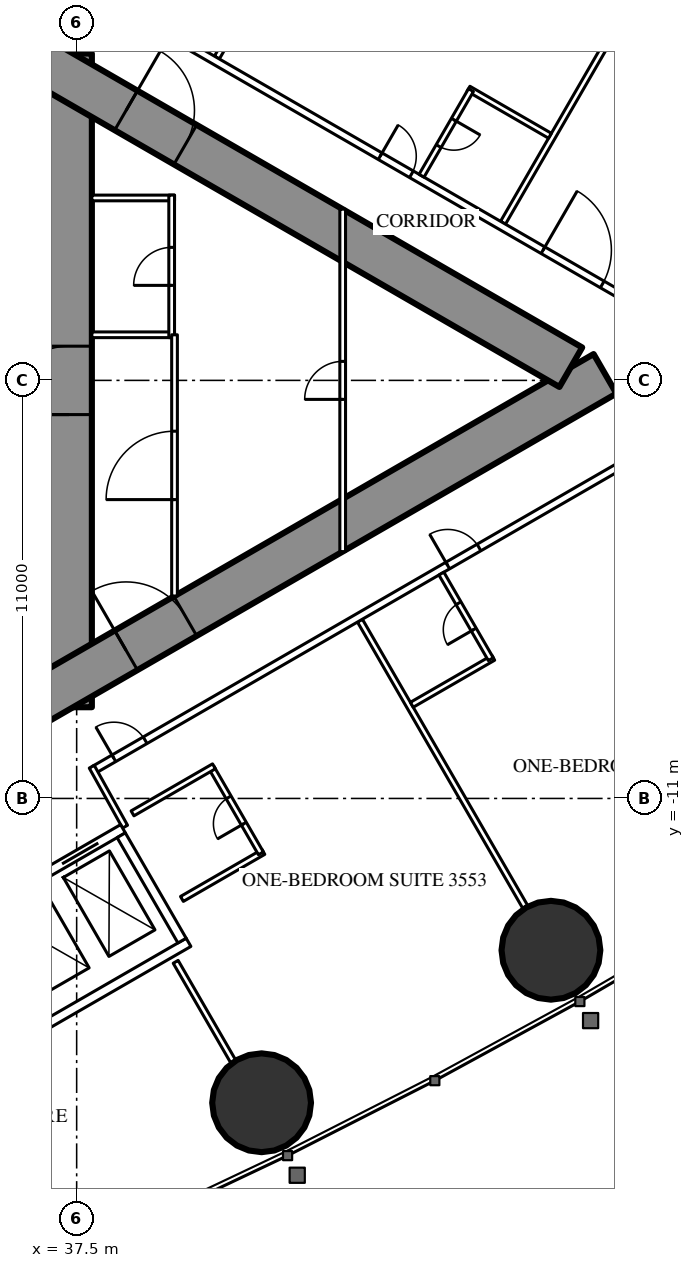
"""IFC4 building model, lengths in metres.
Left out: names, types, materials, properties, quantities, classifications, styles, units other than length and angle.
Written with IfcOpenShell. Run it as: python <this file> out.ifc"""

import sys

from ifc_helpers import new_model, si_unit, direction, frame, frame_2d, origin, origin_2d, place, context, subcontext, project, spatial, rectangle, hollow_circle, extrude, element, fill, save


model = new_model("IFC4")
c1 = context("Model", 3, precision=1e-05, world=origin(), true_north=direction((0.0, 1.0)))
c2 = subcontext(c1, "Body", "Model", "MODEL_VIEW")
j1 = project(units=[si_unit("LENGTHUNIT", "METRE"), si_unit("PLANEANGLEUNIT", "RADIAN")], contexts=[c1])
p1 = place(None, origin())
s1 = spatial("IfcSite", under=j1, at=p1, CompositionType="ELEMENT")
p2 = place(p1, origin())
s2 = spatial("IfcBuilding", under=s1, at=p2, CompositionType="ELEMENT")
p3 = place(p2, frame((0.0, 0.0, 132.6)))
s3 = spatial("IfcBuildingStorey", under=s2, at=p3, CompositionType="ELEMENT", Elevation=132.6)
for number, where, z_axis, x_axis in (
    (1, (42.366, -19.007, 0.0), (0.0, 0.0, 1.0), (1.0, 0.0, 0.0)),
    (2, (49.979, -14.994, 0.0), (0.0, 0.0, 1.0), (1.0, 0.0, 0.0)),
):
    element("IfcColumn", number, at=place(p3, frame(where, z_axis=z_axis, x_axis=x_axis)), inside=s3, PredefinedType="COLUMN", context=c2, shape_type="SweptSolid", body=[
        extrude(hollow_circle(Radius=1.3, WallThickness=0.1, at=origin_2d()), origin(), (0.0, 0.0, 1.0), 3.5),
    ])
p4 = place(p3, frame((37.3, -8.6, 0.0), z_axis=(0.0, 0.0, 1.0), x_axis=(0.0, 1.0, 0.0)))
e3 = element("IfcWall", 3, at=p4, inside=s3, PredefinedType="SHEAR", context=c2, shape_type="SweptSolid", body=[
    extrude(rectangle(XDim=17.2, YDim=1.2, at=frame_2d((8.6, 0.0))), origin(), (0.0, 0.0, 1.0), 3.5),
])
p5 = place(p4, frame((7.7, 0.0, 0.0)))
e4 = element("IfcOpeningElement", 4, at=p5, cuts=e3, PredefinedType="OPENING", context=c2, shape_type="SweptSolid", body=[
    extrude(rectangle(XDim=1.8, YDim=2.2, at=frame_2d((0.9, 1.1))), frame((0.0, 0.61, 0.0), z_axis=(0.0, -1.0, 0.0), x_axis=(1.0, 0.0, 0.0)), (0.0, 0.0, 1.0), 1.22),
])
p6 = place(p3, frame((27.2, -13.8, 0.0), z_axis=(0.0, 0.0, 1.0), x_axis=(0.866027159892, 0.499996958321, 0.0)))
e5 = element("IfcWall", 5, at=p6, inside=s3, PredefinedType="SHEAR", context=c2, shape_type="SweptSolid", body=[
    extrude(rectangle(XDim=27.947, YDim=1.2, at=frame_2d((13.973, 0.0))), origin(), (0.0, 0.0, 1.0), 3.5),
])
p7 = place(p6, frame((4.6, 0.0, 0.0)))
e6 = element("IfcOpeningElement", 6, at=p7, cuts=e5, PredefinedType="OPENING", context=c2, shape_type="SweptSolid", body=[
    extrude(rectangle(XDim=1.0, YDim=2.2, at=frame_2d((0.5, 1.1))), frame((0.0, 0.61, 0.0), z_axis=(0.0, -1.0, 0.0), x_axis=(1.0, 0.0, 0.0)), (0.0, 0.0, 1.0), 1.22),
])
p8 = place(p6, frame((13.395, 0.0, 0.0)))
e7 = element("IfcOpeningElement", 7, at=p8, cuts=e5, PredefinedType="OPENING", context=c2, shape_type="SweptSolid", body=[
    extrude(rectangle(XDim=1.8, YDim=2.2, at=frame_2d((0.9, 1.1))), frame((0.0, 0.61, 0.0), z_axis=(0.0, -1.0, 0.0), x_axis=(1.0, 0.0, 0.0)), (0.0, 0.0, 1.0), 1.22),
])
p9 = place(p3, frame((27.2, 13.8, 0.0), z_axis=(0.0, 0.0, 1.0), x_axis=(0.866024515034, -0.500001539357, 0.0)))
e8 = element("IfcWall", 8, at=p9, inside=s3, PredefinedType="SHEAR", context=c2, shape_type="SweptSolid", body=[
    extrude(rectangle(XDim=26.907, YDim=1.2, at=frame_2d((13.454, 0.0))), origin(), (0.0, 0.0, 1.0), 3.5),
])
p10 = place(p9, frame((4.6, 0.0, 0.0)))
e9 = element("IfcOpeningElement", 9, at=p10, cuts=e8, PredefinedType="OPENING", context=c2, shape_type="SweptSolid", body=[
    extrude(rectangle(XDim=1.0, YDim=2.2, at=frame_2d((0.5, 1.1))), frame((0.0, 0.61, 0.0), z_axis=(0.0, -1.0, 0.0), x_axis=(1.0, 0.0, 0.0)), (0.0, 0.0, 1.0), 1.22),
])
p11 = place(p9, frame((13.395, 0.0, 0.0)))
e10 = element("IfcOpeningElement", 10, at=p11, cuts=e8, PredefinedType="OPENING", context=c2, shape_type="SweptSolid", body=[
    extrude(rectangle(XDim=1.8, YDim=2.2, at=frame_2d((0.9, 1.1))), frame((0.0, 0.61, 0.0), z_axis=(0.0, -1.0, 0.0), x_axis=(1.0, 0.0, 0.0)), (0.0, 0.0, 1.0), 1.22),
])
p12 = place(p3, frame((44.954, -6.321, 0.0), z_axis=(0.0, 0.0, 1.0), x_axis=(0.500018676722, -0.866014620505, 0.0)))
e11 = element("IfcWall", 11, at=p12, inside=s3, PredefinedType="PARTITIONING", context=c2, shape_type="SweptSolid", body=[
    extrude(rectangle(XDim=8.704, YDim=0.15, at=frame_2d((4.352, 0.0))), origin(), (0.0, 0.0, 1.0), 2.2),
])
p13 = place(p3, frame((41.19, 8.494, 0.0), z_axis=(0.0, 0.0, 1.0), x_axis=(0.49999258054, 0.866029687369, 0.0)))
e12 = element("IfcWall", 12, at=p13, inside=s3, PredefinedType="PARTITIONING", context=c2, shape_type="SweptSolid", body=[
    extrude(rectangle(XDim=11.318, YDim=0.15, at=frame_2d((5.659, 0.0))), origin(), (0.0, 0.0, 1.0), 3.25),
])
p14 = place(p3, frame((48.719, 4.147, 0.0), z_axis=(0.0, 0.0, 1.0), x_axis=(0.499993328235, 0.866029255696, 0.0)))
e13 = element("IfcWall", 13, at=p14, inside=s3, PredefinedType="PARTITIONING", context=c2, shape_type="SweptSolid", body=[
    extrude(rectangle(XDim=8.686, YDim=0.15, at=frame_2d((4.343, 0.0))), origin(), (0.0, 0.0, 1.0), 2.2),
])
p15 = place(p3, frame((40.105, -15.299, 0.0), z_axis=(0.0, 0.0, 1.0), x_axis=(0.499978822259, -0.866037630414, 0.0)))
e14 = element("IfcWall", 14, at=p15, inside=s3, PredefinedType="PARTITIONING", context=c2, shape_type="SweptSolid", body=[
    extrude(rectangle(XDim=3.023, YDim=0.15, at=frame_2d((1.511, 0.0))), origin(), (0.0, 0.0, 1.0), 3.25),
])
p16 = place(p3, frame((37.96, -10.243, 0.0), z_axis=(0.0, 0.0, 1.0), x_axis=(0.866026429433, 0.499998223521, 0.0)))
e15 = element("IfcWall", 15, at=p16, inside=s3, PredefinedType="PARTITIONING", context=c2, shape_type="SweptSolid", body=[
    extrude(rectangle(XDim=20.487, YDim=0.2, at=frame_2d((10.243, 0.0))), origin(), (0.0, 0.0, 1.0), 3.25),
])
p17 = place(p16, frame((10.743, 0.0, 0.0)))
e16 = element("IfcOpeningElement", 16, at=p17, cuts=e15, PredefinedType="OPENING", context=c2, shape_type="SweptSolid", body=[
    extrude(rectangle(XDim=0.95, YDim=2.2, at=frame_2d((0.475, 1.1))), frame((0.0, 0.11, 0.0), z_axis=(0.0, -1.0, 0.0), x_axis=(1.0, 0.0, 0.0)), (0.0, 0.0, 1.0), 0.22),
])
p18 = place(p16, frame((17.586, 0.0, 0.0)))
e17 = element("IfcOpeningElement", 17, at=p18, cuts=e15, PredefinedType="OPENING", context=c2, shape_type="SweptSolid", body=[
    extrude(rectangle(XDim=1.8, YDim=2.2, at=frame_2d((0.9, 1.1))), frame((0.0, 0.11, 0.0), z_axis=(0.0, -1.0, 0.0), x_axis=(1.0, 0.0, 0.0)), (0.0, 0.0, 1.0), 0.22),
])
p19 = place(p16, frame((0.6, 0.0, 0.0)))
e18 = element("IfcOpeningElement", 18, at=p19, cuts=e15, PredefinedType="OPENING", context=c2, shape_type="SweptSolid", body=[
    extrude(rectangle(XDim=0.95, YDim=2.2, at=frame_2d((0.475, 1.1))), frame((0.0, 0.11, 0.0), z_axis=(0.0, -1.0, 0.0), x_axis=(1.0, 0.0, 0.0)), (0.0, 0.0, 1.0), 0.22),
])
p20 = place(p3, frame((36.834, 10.894, 0.0), z_axis=(0.0, 0.0, 1.0), x_axis=(0.866028157229, -0.499995230863, 0.0)))
e19 = element("IfcWall", 19, at=p20, inside=s3, PredefinedType="PARTITIONING", context=c2, shape_type="SweptSolid", body=[
    extrude(rectangle(XDim=21.667, YDim=0.2, at=frame_2d((10.833, 0.0))), origin(), (0.0, 0.0, 1.0), 3.25),
])
p21 = place(p20, frame((20.117, 0.0, 0.0)))
e20 = element("IfcOpeningElement", 20, at=p21, cuts=e19, PredefinedType="OPENING", context=c2, shape_type="SweptSolid", body=[
    extrude(rectangle(XDim=0.95, YDim=2.2, at=frame_2d((0.475, 1.1))), frame((0.0, 0.11, 0.0), z_axis=(0.0, -1.0, 0.0), x_axis=(1.0, 0.0, 0.0)), (0.0, 0.0, 1.0), 0.22),
])
p22 = place(p20, frame((14.938, 0.0, 0.0)))
e21 = element("IfcOpeningElement", 21, at=p22, cuts=e19, PredefinedType="OPENING", context=c2, shape_type="SweptSolid", body=[
    extrude(rectangle(XDim=1.8, YDim=2.2, at=frame_2d((0.9, 1.1))), frame((0.0, 0.11, 0.0), z_axis=(0.0, -1.0, 0.0), x_axis=(1.0, 0.0, 0.0)), (0.0, 0.0, 1.0), 0.22),
])
p23 = place(p20, frame((9.99, 0.0, 0.0)))
e22 = element("IfcOpeningElement", 22, at=p23, cuts=e19, PredefinedType="OPENING", context=c2, shape_type="SweptSolid", body=[
    extrude(rectangle(XDim=0.95, YDim=2.2, at=frame_2d((0.475, 1.1))), frame((0.0, 0.11, 0.0), z_axis=(0.0, -1.0, 0.0), x_axis=(1.0, 0.0, 0.0)), (0.0, 0.0, 1.0), 0.22),
])
p24 = place(p20, frame((3.35, 0.0, 0.0)))
e23 = element("IfcOpeningElement", 23, at=p24, cuts=e19, PredefinedType="OPENING", context=c2, shape_type="SweptSolid", body=[
    extrude(rectangle(XDim=1.0, YDim=2.2, at=frame_2d((0.5, 1.1))), frame((0.0, 0.11, 0.0), z_axis=(0.0, -1.0, 0.0), x_axis=(1.0, 0.0, 0.0)), (0.0, 0.0, 1.0), 0.22),
])
p25 = place(p3, frame((38.773, -11.742, 0.0), z_axis=(0.0, 0.0, 1.0), x_axis=(-0.485528096672, 0.8742210632, 0.0)))
e24 = element("IfcWall", 24, at=p25, inside=s3, PredefinedType="PARTITIONING", context=c2, shape_type="SweptSolid", body=[
    extrude(rectangle(XDim=1.805, YDim=0.15, at=frame_2d((0.903, 0.0))), origin(), (0.0, 0.0, 1.0), 3.25),
])
p26 = place(p3, frame((46.319, -8.535, 0.0), z_axis=(0.0, 0.0, 1.0), x_axis=(0.866006523861, 0.500032699561, 0.0)))
e25 = element("IfcWall", 25, at=p26, inside=s3, PredefinedType="PARTITIONING", context=c2, shape_type="SweptSolid", body=[
    extrude(rectangle(XDim=2.475, YDim=0.15, at=frame_2d((1.237, 0.0))), origin(), (0.0, 0.0, 1.0), 3.25),
])
p27 = place(p3, frame((47.097, -5.084, 0.0), z_axis=(0.0, 0.0, 1.0), x_axis=(0.500006934395, -0.866021400173, 0.0)))
e26 = element("IfcWall", 26, at=p27, inside=s3, PredefinedType="PARTITIONING", context=c2, shape_type="SweptSolid", body=[
    extrude(rectangle(XDim=2.6, YDim=0.15, at=frame_2d((1.3, 0.0))), origin(), (0.0, 0.0, 1.0), 3.25),
])
p28 = place(p27, frame((0.9, 0.0, 0.0)))
e27 = element("IfcOpeningElement", 27, at=p28, cuts=e26, PredefinedType="OPENING", context=c2, shape_type="SweptSolid", body=[
    extrude(rectangle(XDim=0.8, YDim=2.2, at=frame_2d((0.4, 1.1))), frame((0.0, 0.085, 0.0), z_axis=(0.0, -1.0, 0.0), x_axis=(1.0, 0.0, 0.0)), (0.0, 0.0, 1.0), 0.17),
])
p29 = place(p3, frame((47.81, 7.674, 0.0), z_axis=(0.0, 0.0, 1.0), x_axis=(0.866031185235, -0.4999899861, 0.0)))
e28 = element("IfcWall", 28, at=p29, inside=s3, PredefinedType="PARTITIONING", context=c2, shape_type="SweptSolid", body=[
    extrude(rectangle(XDim=2.475, YDim=0.15, at=frame_2d((1.238, 0.0))), origin(), (0.0, 0.0, 1.0), 3.25),
])
p30 = place(p3, frame((46.575, 5.385, 0.0), z_axis=(0.0, 0.0, 1.0), x_axis=(0.500006934395, 0.866021400173, 0.0)))
e29 = element("IfcWall", 29, at=p30, inside=s3, PredefinedType="PARTITIONING", context=c2, shape_type="SweptSolid", body=[
    extrude(rectangle(XDim=2.6, YDim=0.15, at=frame_2d((1.3, 0.0))), origin(), (0.0, 0.0, 1.0), 3.25),
])
p31 = place(p30, frame((0.9, 0.0, 0.0)))
e30 = element("IfcOpeningElement", 30, at=p31, cuts=e29, PredefinedType="OPENING", context=c2, shape_type="SweptSolid", body=[
    extrude(rectangle(XDim=0.8, YDim=2.2, at=frame_2d((0.4, 1.1))), frame((0.0, 0.085, 0.0), z_axis=(0.0, -1.0, 0.0), x_axis=(1.0, 0.0, 0.0)), (0.0, 0.0, 1.0), 0.17),
])
p32 = place(p3, frame((40.27, -13.644, 0.0), z_axis=(0.0, 0.0, 1.0), x_axis=(0.866031185235, 0.4999899861, 0.0)))
e31 = element("IfcWall", 31, at=p32, inside=s3, PredefinedType="PARTITIONING", context=c2, shape_type="SweptSolid", body=[
    extrude(rectangle(XDim=2.475, YDim=0.15, at=frame_2d((1.238, 0.0))), origin(), (0.0, 0.0, 1.0), 3.25),
])
p33 = place(p3, frame((41.048, -10.193, 0.0), z_axis=(0.0, 0.0, 1.0), x_axis=(0.500047596559, -0.865997922154, 0.0)))
e32 = element("IfcWall", 32, at=p33, inside=s3, PredefinedType="PARTITIONING", context=c2, shape_type="SweptSolid", body=[
    extrude(rectangle(XDim=2.6, YDim=0.15, at=frame_2d((1.3, 0.0))), origin(), (0.0, 0.0, 1.0), 3.25),
])
p34 = place(p33, frame((0.9, 0.0, 0.0)))
e33 = element("IfcOpeningElement", 33, at=p34, cuts=e32, PredefinedType="OPENING", context=c2, shape_type="SweptSolid", body=[
    extrude(rectangle(XDim=0.8, YDim=2.2, at=frame_2d((0.4, 1.1))), frame((0.0, 0.085, 0.0), z_axis=(0.0, -1.0, 0.0), x_axis=(1.0, 0.0, 0.0)), (0.0, 0.0, 1.0), 0.17),
])
p35 = place(p3, frame((38.97, -11.393, 0.0), z_axis=(0.0, 0.0, 1.0), x_axis=(0.866031185235, 0.4999899861, 0.0)))
e34 = element("IfcWall", 34, at=p35, inside=s3, PredefinedType="PARTITIONING", context=c2, shape_type="SweptSolid", body=[
    extrude(rectangle(XDim=2.475, YDim=0.15, at=frame_2d((1.238, 0.0))), origin(), (0.0, 0.0, 1.0), 3.25),
])
for number, where, z_axis, x_axis in (
    (35, (37.9, 1.2, 0.0), (0.0, 0.0, 1.0), (1.0, 0.0, 0.0)),
    (36, (37.9, 4.8, 0.0), (0.0, 0.0, 1.0), (1.0, 0.0, 0.0)),
):
    element("IfcWall", number, at=place(p3, frame(where, z_axis=z_axis, x_axis=x_axis)), inside=s3, PredefinedType="PARTITIONING", context=c2, shape_type="SweptSolid", body=[
        extrude(rectangle(XDim=2.175, YDim=0.15, at=frame_2d((1.087, 0.0))), origin(), (0.0, 0.0, 1.0), 3.25),
    ])
p36 = place(p3, frame((40.0, 1.125, 0.0), z_axis=(0.0, 0.0, 1.0), x_axis=(0.0, 1.0, 0.0)))
e37 = element("IfcWall", 37, at=p36, inside=s3, PredefinedType="PARTITIONING", context=c2, shape_type="SweptSolid", body=[
    extrude(rectangle(XDim=3.75, YDim=0.15, at=frame_2d((1.875, 0.0))), origin(), (0.0, 0.0, 1.0), 3.25),
])
p37 = place(p36, frame((1.375, 0.0, 0.0)))
e38 = element("IfcOpeningElement", 38, at=p37, cuts=e37, PredefinedType="OPENING", context=c2, shape_type="SweptSolid", body=[
    extrude(rectangle(XDim=1.0, YDim=2.2, at=frame_2d((0.5, 1.1))), frame((0.0, 0.085, 0.0), z_axis=(0.0, -1.0, 0.0), x_axis=(1.0, 0.0, 0.0)), (0.0, 0.0, 1.0), 0.17),
])
p38 = place(p3, frame((40.075, -5.674, 0.0), z_axis=(0.0, 0.0, 1.0), x_axis=(0.0, 1.0, 0.0)))
e39 = element("IfcWall", 39, at=p38, inside=s3, PredefinedType="PARTITIONING", context=c2, shape_type="SweptSolid", body=[
    extrude(rectangle(XDim=6.874, YDim=0.15, at=frame_2d((3.437, 0.0))), origin(), (0.0, 0.0, 1.0), 3.25),
])
p39 = place(p38, frame((2.537, 0.0, 0.0)))
e40 = element("IfcOpeningElement", 40, at=p39, cuts=e39, PredefinedType="OPENING", context=c2, shape_type="SweptSolid", body=[
    extrude(rectangle(XDim=1.8, YDim=2.2, at=frame_2d((0.9, 1.1))), frame((0.0, 0.085, 0.0), z_axis=(0.0, -1.0, 0.0), x_axis=(1.0, 0.0, 0.0)), (0.0, 0.0, 1.0), 0.17),
])
p40 = place(p3, frame((44.5, -4.505, 0.0), z_axis=(0.0, 0.0, 1.0), x_axis=(0.0, 1.0, 0.0)))
e41 = element("IfcWall", 41, at=p40, inside=s3, PredefinedType="PARTITIONING", context=c2, shape_type="SweptSolid", body=[
    extrude(rectangle(XDim=9.009, YDim=0.15, at=frame_2d((4.505, 0.0))), origin(), (0.0, 0.0, 1.0), 2.45),
])
p41 = place(p40, frame((4.005, 0.0, 0.0)))
e42 = element("IfcOpeningElement", 42, at=p41, cuts=e41, PredefinedType="OPENING", context=c2, shape_type="SweptSolid", body=[
    extrude(rectangle(XDim=1.0, YDim=2.2, at=frame_2d((0.5, 1.1))), frame((0.0, 0.085, 0.0), z_axis=(0.0, -1.0, 0.0), x_axis=(1.0, 0.0, 0.0)), (0.0, 0.0, 1.0), 0.17),
])
p42 = place(p3, frame((31.271, -16.097, 0.0), z_axis=(0.0, 0.0, 1.0), x_axis=(0.86604045752, 0.499973925258, 0.0)))
e43 = element("IfcWall", 43, at=p42, inside=s3, PredefinedType="PARTITIONING", context=c2, shape_type="SweptSolid", body=[
    extrude(rectangle(XDim=8.6, YDim=0.25, at=frame_2d((4.3, 0.0))), origin(), (0.0, 0.0, 1.0), 3.25),
])
p43 = place(p42, frame((0.75, 0.0, 0.0)))
e44 = element("IfcOpeningElement", 44, at=p43, cuts=e43, PredefinedType="OPENING", context=c2, shape_type="SweptSolid", body=[
    extrude(rectangle(XDim=1.1, YDim=2.2, at=frame_2d((0.55, 1.1))), frame((0.0, 0.135, 0.0), z_axis=(0.0, -1.0, 0.0), x_axis=(1.0, 0.0, 0.0)), (0.0, 0.0, 1.0), 0.27),
])
p44 = place(p42, frame((2.75, 0.0, 0.0)))
e45 = element("IfcOpeningElement", 45, at=p44, cuts=e43, PredefinedType="OPENING", context=c2, shape_type="SweptSolid", body=[
    extrude(rectangle(XDim=1.1, YDim=2.2, at=frame_2d((0.55, 1.1))), frame((0.0, 0.135, 0.0), z_axis=(0.0, -1.0, 0.0), x_axis=(1.0, 0.0, 0.0)), (0.0, 0.0, 1.0), 0.27),
])
p45 = place(p42, frame((4.75, 0.0, 0.0)))
e46 = element("IfcOpeningElement", 46, at=p45, cuts=e43, PredefinedType="OPENING", context=c2, shape_type="SweptSolid", body=[
    extrude(rectangle(XDim=1.1, YDim=2.2, at=frame_2d((0.55, 1.1))), frame((0.0, 0.135, 0.0), z_axis=(0.0, -1.0, 0.0), x_axis=(1.0, 0.0, 0.0)), (0.0, 0.0, 1.0), 0.27),
])
p46 = place(p42, frame((6.75, 0.0, 0.0)))
e47 = element("IfcOpeningElement", 47, at=p46, cuts=e43, PredefinedType="OPENING", context=c2, shape_type="SweptSolid", body=[
    extrude(rectangle(XDim=1.1, YDim=2.2, at=frame_2d((0.55, 1.1))), frame((0.0, 0.135, 0.0), z_axis=(0.0, -1.0, 0.0), x_axis=(1.0, 0.0, 0.0)), (0.0, 0.0, 1.0), 0.27),
])
p47 = place(p3, frame((32.996, -19.086, 0.0), z_axis=(0.0, 0.0, 1.0), x_axis=(0.866028165386, 0.499995216735, 0.0)))
e48 = element("IfcWall", 48, at=p47, inside=s3, PredefinedType="PARTITIONING", context=c2, shape_type="SweptSolid", body=[
    extrude(rectangle(XDim=8.6, YDim=0.25, at=frame_2d((4.3, 0.0))), origin(), (0.0, 0.0, 1.0), 3.25),
])
p48 = place(p3, frame((38.673, -11.968, 0.0), z_axis=(0.0, 0.0, 1.0), x_axis=(0.499929347863, -0.866066190972, 0.0)))
e49 = element("IfcWall", 49, at=p48, inside=s3, PredefinedType="PARTITIONING", context=c2, shape_type="SweptSolid", body=[
    extrude(rectangle(XDim=3.201, YDim=0.25, at=frame_2d((1.6, 0.0))), origin(), (0.0, 0.0, 1.0), 3.25),
])
p49 = place(p28, origin())
e50 = element("IfcDoor", 50, at=p49, inside=s3, OperationType="SINGLE_SWING_RIGHT", PredefinedType="DOOR", context=c2, shape_type="SweptSolid", body=[
    extrude(rectangle(XDim=0.8, YDim=2.2, at=frame_2d((0.4, 1.1))), frame((0.0, 0.025, 0.0), z_axis=(0.0, -1.0, 0.0), x_axis=(1.0, 0.0, 0.0)), (0.0, 0.0, 1.0), 0.05),
])
fill(e27, e50)
p50 = place(p17, origin())
e51 = element("IfcDoor", 51, at=p50, inside=s3, OperationType="SINGLE_SWING_LEFT", PredefinedType="DOOR", context=c2, shape_type="SweptSolid", body=[
    extrude(rectangle(XDim=0.95, YDim=2.2, at=frame_2d((0.475, 1.1))), frame((0.0, 0.025, 0.0), z_axis=(0.0, -1.0, 0.0), x_axis=(1.0, 0.0, 0.0)), (0.0, 0.0, 1.0), 0.05),
])
fill(e16, e51)
p51 = place(p22, origin())
e52 = element("IfcDoor", 52, at=p51, inside=s3, OperationType="DOUBLE_DOOR_SINGLE_SWING", PredefinedType="DOOR", context=c2, shape_type="SweptSolid", body=[
    extrude(rectangle(XDim=1.8, YDim=2.2, at=frame_2d((0.9, 1.1))), frame((0.0, 0.025, 0.0), z_axis=(0.0, -1.0, 0.0), x_axis=(1.0, 0.0, 0.0)), (0.0, 0.0, 1.0), 0.05),
])
fill(e21, e52)
p52 = place(p31, origin())
e53 = element("IfcDoor", 53, at=p52, inside=s3, OperationType="SINGLE_SWING_RIGHT", PredefinedType="DOOR", context=c2, shape_type="SweptSolid", body=[
    extrude(rectangle(XDim=0.8, YDim=2.2, at=frame_2d((0.4, 1.1))), frame((0.0, 0.025, 0.0), z_axis=(0.0, -1.0, 0.0), x_axis=(1.0, 0.0, 0.0)), (0.0, 0.0, 1.0), 0.05),
])
fill(e30, e53)
p53 = place(p23, origin())
e54 = element("IfcDoor", 54, at=p53, inside=s3, OperationType="SINGLE_SWING_LEFT", PredefinedType="DOOR", context=c2, shape_type="SweptSolid", body=[
    extrude(rectangle(XDim=0.95, YDim=2.2, at=frame_2d((0.475, 1.1))), frame((0.0, 0.025, 0.0), z_axis=(0.0, -1.0, 0.0), x_axis=(1.0, 0.0, 0.0)), (0.0, 0.0, 1.0), 0.05),
])
fill(e22, e54)
p54 = place(p34, origin())
e55 = element("IfcDoor", 55, at=p54, inside=s3, OperationType="SINGLE_SWING_RIGHT", PredefinedType="DOOR", context=c2, shape_type="SweptSolid", body=[
    extrude(rectangle(XDim=0.8, YDim=2.2, at=frame_2d((0.4, 1.1))), frame((0.0, 0.025, 0.0), z_axis=(0.0, -1.0, 0.0), x_axis=(1.0, 0.0, 0.0)), (0.0, 0.0, 1.0), 0.05),
])
fill(e33, e55)
p55 = place(p19, origin())
e56 = element("IfcDoor", 56, at=p55, inside=s3, OperationType="SINGLE_SWING_LEFT", PredefinedType="DOOR", context=c2, shape_type="SweptSolid", body=[
    extrude(rectangle(XDim=0.95, YDim=2.2, at=frame_2d((0.475, 1.1))), frame((0.0, 0.025, 0.0), z_axis=(0.0, -1.0, 0.0), x_axis=(1.0, 0.0, 0.0)), (0.0, 0.0, 1.0), 0.05),
])
fill(e18, e56)
p56 = place(p37, origin())
e57 = element("IfcDoor", 57, at=p56, inside=s3, OperationType="SINGLE_SWING_LEFT", PredefinedType="DOOR", context=c2, shape_type="SweptSolid", body=[
    extrude(rectangle(XDim=1.0, YDim=2.2, at=frame_2d((0.5, 1.1))), frame((0.0, 0.025, 0.0), z_axis=(0.0, -1.0, 0.0), x_axis=(1.0, 0.0, 0.0)), (0.0, 0.0, 1.0), 0.05),
])
fill(e38, e57)
p57 = place(p39, origin())
e58 = element("IfcDoor", 58, at=p57, inside=s3, OperationType="DOUBLE_DOOR_SINGLE_SWING", PredefinedType="DOOR", context=c2, shape_type="SweptSolid", body=[
    extrude(rectangle(XDim=1.8, YDim=2.2, at=frame_2d((0.9, 1.1))), frame((0.0, 0.025, 0.0), z_axis=(0.0, -1.0, 0.0), x_axis=(1.0, 0.0, 0.0)), (0.0, 0.0, 1.0), 0.05),
])
fill(e40, e58)
p58 = place(p41, origin())
e59 = element("IfcDoor", 59, at=p58, inside=s3, OperationType="SINGLE_SWING_LEFT", PredefinedType="DOOR", context=c2, shape_type="SweptSolid", body=[
    extrude(rectangle(XDim=1.0, YDim=2.2, at=frame_2d((0.5, 1.1))), frame((0.0, 0.025, 0.0), z_axis=(0.0, -1.0, 0.0), x_axis=(1.0, 0.0, 0.0)), (0.0, 0.0, 1.0), 0.05),
])
fill(e42, e59)
p59 = place(p8, origin())
e60 = element("IfcDoor", 60, at=p59, inside=s3, OperationType="DOUBLE_DOOR_SINGLE_SWING", PredefinedType="DOOR", context=c2, shape_type="SweptSolid", body=[
    extrude(rectangle(XDim=1.8, YDim=2.2, at=frame_2d((0.9, 1.1))), frame((0.0, 0.025, 0.0), z_axis=(0.0, -1.0, 0.0), x_axis=(1.0, 0.0, 0.0)), (0.0, 0.0, 1.0), 0.05),
])
fill(e7, e60)
p60 = place(p11, origin())
e61 = element("IfcDoor", 61, at=p60, inside=s3, OperationType="DOUBLE_DOOR_SINGLE_SWING", PredefinedType="DOOR", context=c2, shape_type="SweptSolid", body=[
    extrude(rectangle(XDim=1.8, YDim=2.2, at=frame_2d((0.9, 1.1))), frame((0.0, 0.025, 0.0), z_axis=(0.0, -1.0, 0.0), x_axis=(1.0, 0.0, 0.0)), (0.0, 0.0, 1.0), 0.05),
])
fill(e10, e61)
p61 = place(p5, origin())
e62 = element("IfcDoor", 62, at=p61, inside=s3, OperationType="DOUBLE_DOOR_SINGLE_SWING", PredefinedType="DOOR", context=c2, shape_type="SweptSolid", body=[
    extrude(rectangle(XDim=1.8, YDim=2.2, at=frame_2d((0.9, 1.1))), frame((0.0, 0.025, 0.0), z_axis=(0.0, -1.0, 0.0), x_axis=(1.0, 0.0, 0.0)), (0.0, 0.0, 1.0), 0.05),
])
fill(e4, e62)
p62 = place(p46, origin())
e63 = element("IfcDoor", 63, at=p62, inside=s3, OperationType="DOUBLE_DOOR_SLIDING", PredefinedType="USERDEFINED", context=c2, shape_type="SweptSolid", body=[
    extrude(rectangle(XDim=1.1, YDim=2.2, at=frame_2d((0.55, 1.1))), frame((0.0, 0.025, 0.0), z_axis=(0.0, -1.0, 0.0), x_axis=(1.0, 0.0, 0.0)), (0.0, 0.0, 1.0), 0.05),
])
fill(e47, e63)
save(model, sys.argv[1])
